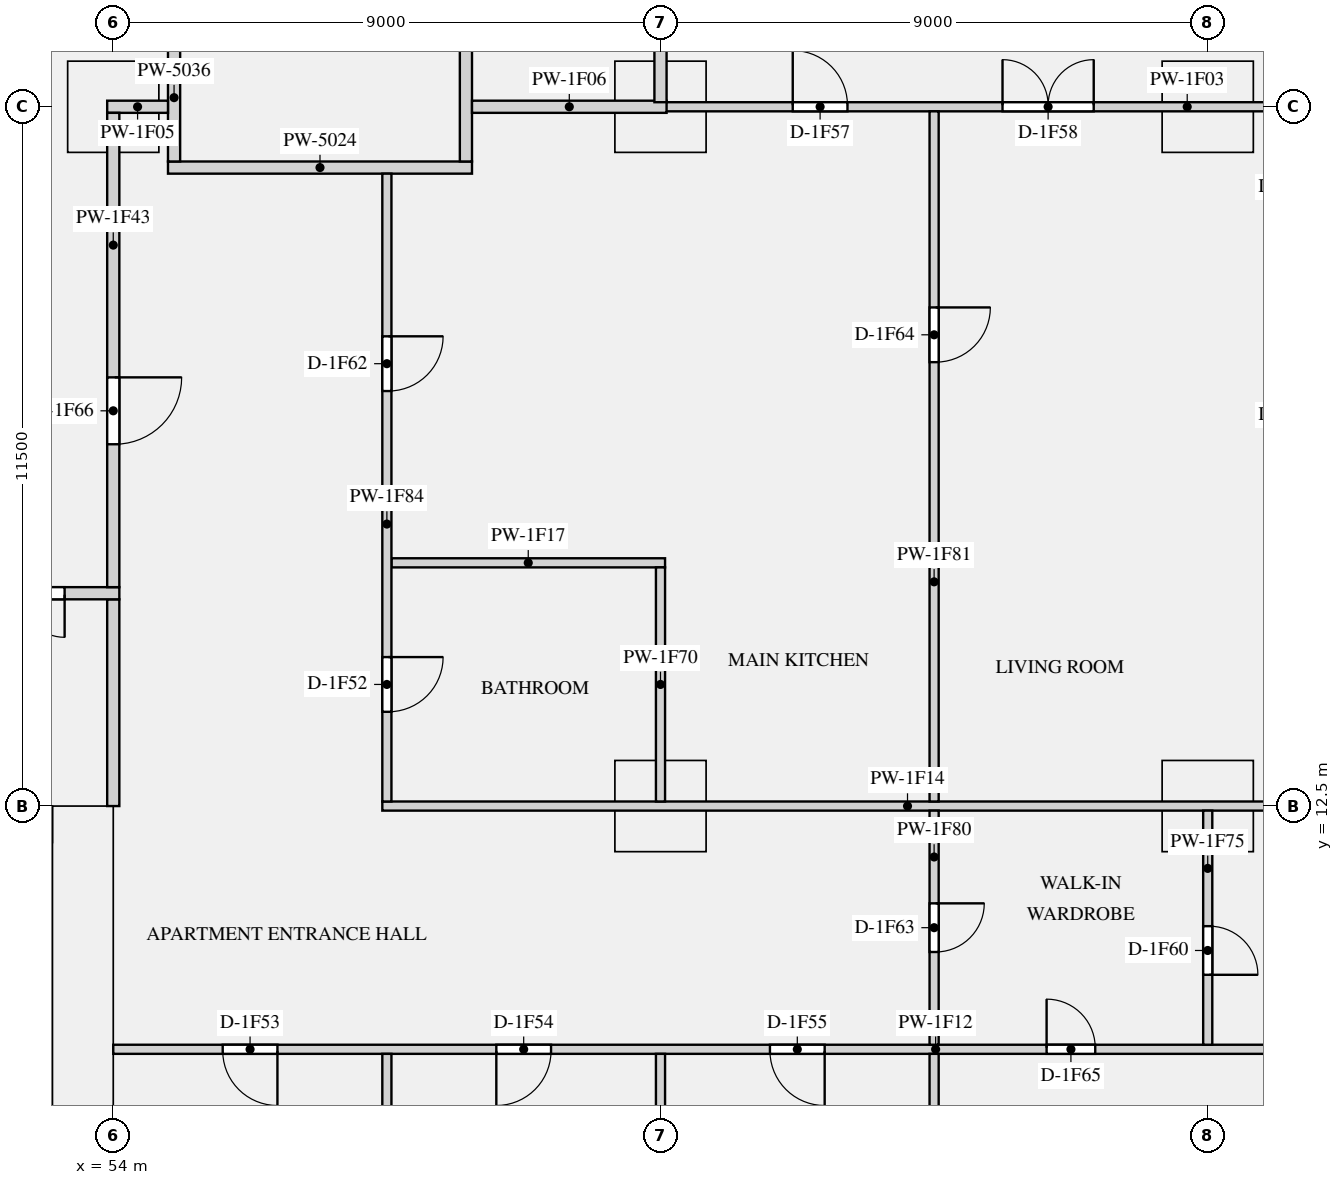
"""IFC4 building model, lengths in metres.
Left out: names, types, materials, properties, quantities, classifications, styles, units other than length and angle.
Written with IfcOpenShell. Run it as: python <this file> out.ifc"""

import sys

from ifc_helpers import new_model, si_unit, direction, frame, frame_2d, origin, origin_2d, place, context, subcontext, project, spatial, rectangle, extrude, element, fill, save


model = new_model("IFC4")
c1 = context("Model", 3, precision=1e-05, world=origin(), true_north=direction((0.0, 1.0)))
c2 = subcontext(c1, "Body", "Model", "MODEL_VIEW")
j1 = project(units=[si_unit("LENGTHUNIT", "METRE"), si_unit("PLANEANGLEUNIT", "RADIAN")], contexts=[c1])
p1 = place(None, origin())
s1 = spatial("IfcSite", under=j1, at=p1, CompositionType="ELEMENT")
p2 = place(p1, origin())
s2 = spatial("IfcBuilding", under=s1, at=p2, CompositionType="ELEMENT")
p3 = place(p2, frame((0.0, 0.0, 60.45)))
s3 = spatial("IfcBuildingStorey", under=s2, at=p3, CompositionType="ELEMENT", Elevation=60.45)
for number, where, z_axis, x_axis in (
    (1, (54.0, 24.0, 0.0), (0.0, 0.0, 1.0), (1.0, 0.0, 0.0)),
    (2, (63.0, 24.0, 0.0), (0.0, 0.0, 1.0), (1.0, 0.0, 0.0)),
    (3, (72.0, 24.0, 0.0), (0.0, 0.0, 1.0), (1.0, 0.0, 0.0)),
    (4, (63.0, 12.5, 0.0), (0.0, 0.0, 1.0), (1.0, 0.0, 0.0)),
    (5, (72.0, 12.5, 0.0), (0.0, 0.0, 1.0), (1.0, 0.0, 0.0)),
):
    element("IfcColumn", number, at=place(p3, frame(where, z_axis=z_axis, x_axis=x_axis)), inside=s3, PredefinedType="COLUMN", context=c2, shape_type="SweptSolid", body=[
        extrude(rectangle(XDim=1.5, YDim=1.5, at=origin_2d()), origin(), (0.0, 0.0, 1.0), 3.15),
    ])
p4 = place(p3, frame((53.5, 0.0, 0.0), z_axis=(0.0, 0.0, 1.0), x_axis=(0.0, 1.0, 0.0)))
e6 = element("IfcWall", 6, at=p4, inside=s3, PredefinedType="SHEAR", context=c2, shape_type="SweptSolid", body=[
    extrude(rectangle(XDim=12.5, YDim=1.0, at=frame_2d((6.25, 0.0))), origin(), (0.0, 0.0, 1.0), 3.15),
])
p5 = place(p3, frame((54.9, 23.0, 0.0), z_axis=(0.0, 0.0, 1.0), x_axis=(1.0, 0.0, 0.0)))
e7 = element("IfcWall", 7, at=p5, inside=s3, PredefinedType="PARTITIONING", context=c2, shape_type="SweptSolid", body=[
    extrude(rectangle(XDim=5.0, YDim=0.2, at=frame_2d((2.5, 0.0))), origin(), (0.0, 0.0, 1.0), 2.83),
])
p6 = place(p3, frame((54.0, 12.5, 0.0), z_axis=(0.0, 0.0, 1.0), x_axis=(0.0, 1.0, 0.0)))
e8 = element("IfcWall", 8, at=p6, inside=s3, PredefinedType="PARTITIONING", context=c2, shape_type="SweptSolid", body=[
    extrude(rectangle(XDim=3.4, YDim=0.2, at=frame_2d((1.7, 0.0))), origin(), (0.0, 0.0, 1.0), 2.83),
])
p7 = place(p3, frame((55.0, 23.1, 0.0), z_axis=(0.0, 0.0, 1.0), x_axis=(0.0, 1.0, 0.0)))
e9 = element("IfcWall", 9, at=p7, inside=s3, PredefinedType="PARTITIONING", context=c2, shape_type="SweptSolid", body=[
    extrude(rectangle(XDim=3.8, YDim=0.2, at=frame_2d((1.9, 0.0))), origin(), (0.0, 0.0, 1.0), 2.83),
])
p8 = place(p7, frame((2.1, 0.0, 0.0)))
e10 = element("IfcOpeningElement", 10, at=p8, cuts=e9, PredefinedType="OPENING", context=c2, shape_type="SweptSolid", body=[
    extrude(rectangle(XDim=1.2, YDim=2.1, at=frame_2d((0.6, 1.05))), frame((0.0, 0.11, 0.0), z_axis=(0.0, -1.0, 0.0), x_axis=(1.0, 0.0, 0.0)), (0.0, 0.0, 1.0), 0.22),
])
p9 = place(p3, frame((59.8, 23.1, 0.0), z_axis=(0.0, 0.0, 1.0), x_axis=(0.0, 1.0, 0.0)))
e11 = element("IfcWall", 11, at=p9, inside=s3, PredefinedType="PARTITIONING", context=c2, shape_type="SweptSolid", body=[
    extrude(rectangle(XDim=3.9, YDim=0.2, at=frame_2d((1.95, 0.0))), origin(), (0.0, 0.0, 1.0), 2.83),
])
p10 = place(p3, frame((62.9, 24.0, 0.0), z_axis=(0.0, 0.0, 1.0), x_axis=(1.0, 0.0, 0.0)))
e12 = element("IfcWall", 12, at=p10, inside=s3, PredefinedType="PARTITIONING", context=c2, shape_type="SweptSolid", body=[
    extrude(rectangle(XDim=10.3, YDim=0.15, at=frame_2d((5.15, 0.0))), origin(), (0.0, 0.0, 1.0), 2.83),
])
p11 = place(p10, frame((2.275, 0.0, 0.0)))
e13 = element("IfcOpeningElement", 13, at=p11, cuts=e12, PredefinedType="OPENING", context=c2, shape_type="SweptSolid", body=[
    extrude(rectangle(XDim=0.9, YDim=2.1, at=frame_2d((0.45, 1.05))), frame((0.0, 0.085, 0.0), z_axis=(0.0, -1.0, 0.0), x_axis=(1.0, 0.0, 0.0)), (0.0, 0.0, 1.0), 0.17),
])
p12 = place(p10, frame((5.725, 0.0, 0.0)))
e14 = element("IfcOpeningElement", 14, at=p12, cuts=e12, PredefinedType="OPENING", context=c2, shape_type="SweptSolid", body=[
    extrude(rectangle(XDim=1.5, YDim=2.1, at=frame_2d((0.75, 1.05))), frame((0.0, 0.085, 0.0), z_axis=(0.0, -1.0, 0.0), x_axis=(1.0, 0.0, 0.0)), (0.0, 0.0, 1.0), 0.17),
])
p13 = place(p3, frame((53.9, 24.0, 0.0), z_axis=(0.0, 0.0, 1.0), x_axis=(1.0, 0.0, 0.0)))
e15 = element("IfcWall", 15, at=p13, inside=s3, PredefinedType="PARTITIONING", context=c2, shape_type="SweptSolid", body=[
    extrude(rectangle(XDim=1.0, YDim=0.2, at=frame_2d((0.5, 0.0))), origin(), (0.0, 0.0, 1.0), 2.83),
])
p14 = place(p3, frame((59.9, 24.0, 0.0), z_axis=(0.0, 0.0, 1.0), x_axis=(1.0, 0.0, 0.0)))
e16 = element("IfcWall", 16, at=p14, inside=s3, PredefinedType="PARTITIONING", context=c2, shape_type="SweptSolid", body=[
    extrude(rectangle(XDim=3.2, YDim=0.2, at=frame_2d((1.6, 0.0))), origin(), (0.0, 0.0, 1.0), 2.83),
])
p15 = place(p3, frame((54.0, 8.5, 0.0), z_axis=(0.0, 0.0, 1.0), x_axis=(1.0, 0.0, 0.0)))
e17 = element("IfcWall", 17, at=p15, inside=s3, PredefinedType="PARTITIONING", context=c2, shape_type="SweptSolid", body=[
    extrude(rectangle(XDim=21.7, YDim=0.15, at=frame_2d((10.85, 0.0))), origin(), (0.0, 0.0, 1.0), 2.83),
])
p16 = place(p15, frame((1.8, 0.0, 0.0)))
e18 = element("IfcOpeningElement", 18, at=p16, cuts=e17, PredefinedType="OPENING", context=c2, shape_type="SweptSolid", body=[
    extrude(rectangle(XDim=0.9, YDim=2.1, at=frame_2d((0.45, 1.05))), frame((0.0, 0.085, 0.0), z_axis=(0.0, -1.0, 0.0), x_axis=(1.0, 0.0, 0.0)), (0.0, 0.0, 1.0), 0.17),
])
p17 = place(p15, frame((6.3, 0.0, 0.0)))
e19 = element("IfcOpeningElement", 19, at=p17, cuts=e17, PredefinedType="OPENING", context=c2, shape_type="SweptSolid", body=[
    extrude(rectangle(XDim=0.9, YDim=2.1, at=frame_2d((0.45, 1.05))), frame((0.0, 0.085, 0.0), z_axis=(0.0, -1.0, 0.0), x_axis=(1.0, 0.0, 0.0)), (0.0, 0.0, 1.0), 0.17),
])
p18 = place(p15, frame((10.8, 0.0, 0.0)))
e20 = element("IfcOpeningElement", 20, at=p18, cuts=e17, PredefinedType="OPENING", context=c2, shape_type="SweptSolid", body=[
    extrude(rectangle(XDim=0.9, YDim=2.1, at=frame_2d((0.45, 1.05))), frame((0.0, 0.085, 0.0), z_axis=(0.0, -1.0, 0.0), x_axis=(1.0, 0.0, 0.0)), (0.0, 0.0, 1.0), 0.17),
])
p19 = place(p15, frame((19.525, 0.0, 0.0)))
e21 = element("IfcOpeningElement", 21, at=p19, cuts=e17, PredefinedType="OPENING", context=c2, shape_type="SweptSolid", body=[
    extrude(rectangle(XDim=0.8, YDim=2.1, at=frame_2d((0.4, 1.05))), frame((0.0, 0.085, 0.0), z_axis=(0.0, -1.0, 0.0), x_axis=(1.0, 0.0, 0.0)), (0.0, 0.0, 1.0), 0.17),
])
p20 = place(p15, frame((15.35, 0.0, 0.0)))
e22 = element("IfcOpeningElement", 22, at=p20, cuts=e17, PredefinedType="OPENING", context=c2, shape_type="SweptSolid", body=[
    extrude(rectangle(XDim=0.8, YDim=2.1, at=frame_2d((0.4, 1.05))), frame((0.0, 0.085, 0.0), z_axis=(0.0, -1.0, 0.0), x_axis=(1.0, 0.0, 0.0)), (0.0, 0.0, 1.0), 0.17),
])
p21 = place(p3, frame((58.425, 12.5, 0.0), z_axis=(0.0, 0.0, 1.0), x_axis=(1.0, 0.0, 0.0)))
e23 = element("IfcWall", 23, at=p21, inside=s3, PredefinedType="PARTITIONING", context=c2, shape_type="SweptSolid", body=[
    extrude(rectangle(XDim=17.275, YDim=0.15, at=frame_2d((8.637, 0.0))), origin(), (0.0, 0.0, 1.0), 2.83),
])
p22 = place(p3, frame((58.575, 16.5, 0.0), z_axis=(0.0, 0.0, 1.0), x_axis=(1.0, 0.0, 0.0)))
e24 = element("IfcWall", 24, at=p22, inside=s3, PredefinedType="PARTITIONING", context=c2, shape_type="SweptSolid", body=[
    extrude(rectangle(XDim=4.5, YDim=0.15, at=frame_2d((2.25, 0.0))), origin(), (0.0, 0.0, 1.0), 2.83),
])
p23 = place(p3, frame((17.9, 16.0, 0.0), z_axis=(0.0, 0.0, 1.0), x_axis=(1.0, 0.0, 0.0)))
e25 = element("IfcWall", 25, at=p23, inside=s3, PredefinedType="PARTITIONING", context=c2, shape_type="SweptSolid", body=[
    extrude(rectangle(XDim=36.2, YDim=0.2, at=frame_2d((18.1, 0.0))), origin(), (0.0, 0.0, 1.0), 2.83),
])
p24 = place(p23, frame((0.9, 0.0, 0.0)))
e26 = element("IfcOpeningElement", 26, at=p24, cuts=e25, PredefinedType="OPENING", context=c2, shape_type="SweptSolid", body=[
    extrude(rectangle(XDim=1.4, YDim=2.1, at=frame_2d((0.7, 1.05))), frame((0.0, 0.11, 0.0), z_axis=(0.0, -1.0, 0.0), x_axis=(1.0, 0.0, 0.0)), (0.0, 0.0, 1.0), 0.22),
])
p25 = place(p23, frame((33.9, 0.0, 0.0)))
e27 = element("IfcOpeningElement", 27, at=p25, cuts=e25, PredefinedType="OPENING", context=c2, shape_type="SweptSolid", body=[
    extrude(rectangle(XDim=1.4, YDim=2.1, at=frame_2d((0.7, 1.05))), frame((0.0, 0.11, 0.0), z_axis=(0.0, -1.0, 0.0), x_axis=(1.0, 0.0, 0.0)), (0.0, 0.0, 1.0), 0.22),
])
p26 = place(p3, frame((54.0, 16.1, 0.0), z_axis=(0.0, 0.0, 1.0), x_axis=(0.0, 1.0, 0.0)))
e28 = element("IfcWall", 28, at=p26, inside=s3, PredefinedType="PARTITIONING", context=c2, shape_type="SweptSolid", body=[
    extrude(rectangle(XDim=7.8, YDim=0.2, at=frame_2d((3.9, 0.0))), origin(), (0.0, 0.0, 1.0), 2.83),
])
p27 = place(p26, frame((2.35, 0.0, 0.0)))
e29 = element("IfcOpeningElement", 29, at=p27, cuts=e28, PredefinedType="OPENING", context=c2, shape_type="SweptSolid", body=[
    extrude(rectangle(XDim=1.1, YDim=2.1, at=frame_2d((0.55, 1.05))), frame((0.0, 0.11, 0.0), z_axis=(0.0, -1.0, 0.0), x_axis=(1.0, 0.0, 0.0)), (0.0, 0.0, 1.0), 0.22),
])
p28 = place(p3, frame((63.0, 0.8, 0.0), z_axis=(0.0, 0.0, 1.0), x_axis=(0.0, 1.0, 0.0)))
e30 = element("IfcWall", 30, at=p28, inside=s3, PredefinedType="PARTITIONING", context=c2, shape_type="SweptSolid", body=[
    extrude(rectangle(XDim=7.625, YDim=0.15, at=frame_2d((3.812, 0.0))), origin(), (0.0, 0.0, 1.0), 2.83),
])
p29 = place(p3, frame((63.0, 12.575, 0.0), z_axis=(0.0, 0.0, 1.0), x_axis=(0.0, 1.0, 0.0)))
e31 = element("IfcWall", 31, at=p29, inside=s3, PredefinedType="PARTITIONING", context=c2, shape_type="SweptSolid", body=[
    extrude(rectangle(XDim=3.85, YDim=0.15, at=frame_2d((1.925, 0.0))), origin(), (0.0, 0.0, 1.0), 2.83),
])
p30 = place(p3, frame((63.0, 24.075, 0.0), z_axis=(0.0, 0.0, 1.0), x_axis=(0.0, 1.0, 0.0)))
e32 = element("IfcWall", 32, at=p30, inside=s3, PredefinedType="PARTITIONING", context=c2, shape_type="SweptSolid", body=[
    extrude(rectangle(XDim=12.075, YDim=0.2, at=frame_2d((6.038, 0.0))), origin(), (0.0, 0.0, 1.0), 2.83),
])
p31 = place(p3, frame((72.0, 8.575, 0.0), z_axis=(0.0, 0.0, 1.0), x_axis=(0.0, 1.0, 0.0)))
e33 = element("IfcWall", 33, at=p31, inside=s3, PredefinedType="PARTITIONING", context=c2, shape_type="SweptSolid", body=[
    extrude(rectangle(XDim=3.85, YDim=0.15, at=frame_2d((1.925, 0.0))), origin(), (0.0, 0.0, 1.0), 2.83),
])
p32 = place(p31, frame((1.15, 0.0, 0.0)))
e34 = element("IfcOpeningElement", 34, at=p32, cuts=e33, PredefinedType="OPENING", context=c2, shape_type="SweptSolid", body=[
    extrude(rectangle(XDim=0.8, YDim=2.1, at=frame_2d((0.4, 1.05))), frame((0.0, 0.085, 0.0), z_axis=(0.0, -1.0, 0.0), x_axis=(1.0, 0.0, 0.0)), (0.0, 0.0, 1.0), 0.17),
])
p33 = place(p3, frame((67.5, 0.8, 0.0), z_axis=(0.0, 0.0, 1.0), x_axis=(0.0, 1.0, 0.0)))
e35 = element("IfcWall", 35, at=p33, inside=s3, PredefinedType="PARTITIONING", context=c2, shape_type="SweptSolid", body=[
    extrude(rectangle(XDim=7.625, YDim=0.15, at=frame_2d((3.812, 0.0))), origin(), (0.0, 0.0, 1.0), 2.83),
])
p34 = place(p3, frame((67.5, 8.575, 0.0), z_axis=(0.0, 0.0, 1.0), x_axis=(0.0, 1.0, 0.0)))
e36 = element("IfcWall", 36, at=p34, inside=s3, PredefinedType="PARTITIONING", context=c2, shape_type="SweptSolid", body=[
    extrude(rectangle(XDim=3.85, YDim=0.15, at=frame_2d((1.925, 0.0))), origin(), (0.0, 0.0, 1.0), 2.83),
])
p35 = place(p34, frame((1.525, 0.0, 0.0)))
e37 = element("IfcOpeningElement", 37, at=p35, cuts=e36, PredefinedType="OPENING", context=c2, shape_type="SweptSolid", body=[
    extrude(rectangle(XDim=0.8, YDim=2.1, at=frame_2d((0.4, 1.05))), frame((0.0, 0.085, 0.0), z_axis=(0.0, -1.0, 0.0), x_axis=(1.0, 0.0, 0.0)), (0.0, 0.0, 1.0), 0.17),
])
p36 = place(p3, frame((67.5, 12.575, 0.0), z_axis=(0.0, 0.0, 1.0), x_axis=(0.0, 1.0, 0.0)))
e38 = element("IfcWall", 38, at=p36, inside=s3, PredefinedType="PARTITIONING", context=c2, shape_type="SweptSolid", body=[
    extrude(rectangle(XDim=11.35, YDim=0.15, at=frame_2d((5.675, 0.0))), origin(), (0.0, 0.0, 1.0), 2.83),
])
p37 = place(p36, frame((7.225, 0.0, 0.0)))
e39 = element("IfcOpeningElement", 39, at=p37, cuts=e38, PredefinedType="OPENING", context=c2, shape_type="SweptSolid", body=[
    extrude(rectangle(XDim=0.9, YDim=2.1, at=frame_2d((0.45, 1.05))), frame((0.0, 0.085, 0.0), z_axis=(0.0, -1.0, 0.0), x_axis=(1.0, 0.0, 0.0)), (0.0, 0.0, 1.0), 0.17),
])
p38 = place(p3, frame((58.5, 0.8, 0.0), z_axis=(0.0, 0.0, 1.0), x_axis=(0.0, 1.0, 0.0)))
e40 = element("IfcWall", 40, at=p38, inside=s3, PredefinedType="PARTITIONING", context=c2, shape_type="SweptSolid", body=[
    extrude(rectangle(XDim=7.625, YDim=0.15, at=frame_2d((3.812, 0.0))), origin(), (0.0, 0.0, 1.0), 2.83),
])
p39 = place(p3, frame((58.5, 12.575, 0.0), z_axis=(0.0, 0.0, 1.0), x_axis=(0.0, 1.0, 0.0)))
e41 = element("IfcWall", 41, at=p39, inside=s3, PredefinedType="PARTITIONING", context=c2, shape_type="SweptSolid", body=[
    extrude(rectangle(XDim=10.325, YDim=0.15, at=frame_2d((5.163, 0.0))), origin(), (0.0, 0.0, 1.0), 2.83),
])
p40 = place(p39, frame((1.475, 0.0, 0.0)))
e42 = element("IfcOpeningElement", 42, at=p40, cuts=e41, PredefinedType="OPENING", context=c2, shape_type="SweptSolid", body=[
    extrude(rectangle(XDim=0.9, YDim=2.1, at=frame_2d((0.45, 1.05))), frame((0.0, 0.085, 0.0), z_axis=(0.0, -1.0, 0.0), x_axis=(1.0, 0.0, 0.0)), (0.0, 0.0, 1.0), 0.17),
])
p41 = place(p39, frame((6.75, 0.0, 0.0)))
e43 = element("IfcOpeningElement", 43, at=p41, cuts=e41, PredefinedType="OPENING", context=c2, shape_type="SweptSolid", body=[
    extrude(rectangle(XDim=0.9, YDim=2.1, at=frame_2d((0.45, 1.05))), frame((0.0, 0.085, 0.0), z_axis=(0.0, -1.0, 0.0), x_axis=(1.0, 0.0, 0.0)), (0.0, 0.0, 1.0), 0.17),
])
p42 = place(p25, frame((1.4, 0.0, 0.0), z_axis=(0.0, 0.0, 1.0), x_axis=(-1.0, 0.0, 0.0)))
e44 = element("IfcDoor", 44, at=p42, inside=s3, OperationType="DOUBLE_DOOR_SINGLE_SWING", PredefinedType="DOOR", context=c2, shape_type="SweptSolid", body=[
    extrude(rectangle(XDim=1.4, YDim=2.1, at=frame_2d((0.7, 1.05))), frame((0.0, 0.025, 0.0), z_axis=(0.0, -1.0, 0.0), x_axis=(1.0, 0.0, 0.0)), (0.0, 0.0, 1.0), 0.05),
])
fill(e27, e44)
p43 = place(p40, frame((0.9, 0.0, 0.0), z_axis=(0.0, 0.0, 1.0), x_axis=(-1.0, 0.0, 0.0)))
e45 = element("IfcDoor", 45, at=p43, inside=s3, OperationType="SINGLE_SWING_LEFT", PredefinedType="DOOR", context=c2, shape_type="SweptSolid", body=[
    extrude(rectangle(XDim=0.9, YDim=2.1, at=frame_2d((0.45, 1.05))), frame((0.0, 0.025, 0.0), z_axis=(0.0, -1.0, 0.0), x_axis=(1.0, 0.0, 0.0)), (0.0, 0.0, 1.0), 0.05),
])
fill(e42, e45)
p44 = place(p16, frame((0.9, 0.0, 0.0), z_axis=(0.0, 0.0, 1.0), x_axis=(-1.0, 0.0, 0.0)))
e46 = element("IfcDoor", 46, at=p44, inside=s3, OperationType="SINGLE_SWING_LEFT", PredefinedType="DOOR", context=c2, shape_type="SweptSolid", body=[
    extrude(rectangle(XDim=0.9, YDim=2.1, at=frame_2d((0.45, 1.05))), frame((0.0, 0.025, 0.0), z_axis=(0.0, -1.0, 0.0), x_axis=(1.0, 0.0, 0.0)), (0.0, 0.0, 1.0), 0.05),
])
fill(e18, e46)
p45 = place(p17, frame((0.9, 0.0, 0.0), z_axis=(0.0, 0.0, 1.0), x_axis=(-1.0, 0.0, 0.0)))
e47 = element("IfcDoor", 47, at=p45, inside=s3, OperationType="SINGLE_SWING_RIGHT", PredefinedType="DOOR", context=c2, shape_type="SweptSolid", body=[
    extrude(rectangle(XDim=0.9, YDim=2.1, at=frame_2d((0.45, 1.05))), frame((0.0, 0.025, 0.0), z_axis=(0.0, -1.0, 0.0), x_axis=(1.0, 0.0, 0.0)), (0.0, 0.0, 1.0), 0.05),
])
fill(e19, e47)
p46 = place(p18, frame((0.9, 0.0, 0.0), z_axis=(0.0, 0.0, 1.0), x_axis=(-1.0, 0.0, 0.0)))
e48 = element("IfcDoor", 48, at=p46, inside=s3, OperationType="SINGLE_SWING_LEFT", PredefinedType="DOOR", context=c2, shape_type="SweptSolid", body=[
    extrude(rectangle(XDim=0.9, YDim=2.1, at=frame_2d((0.45, 1.05))), frame((0.0, 0.025, 0.0), z_axis=(0.0, -1.0, 0.0), x_axis=(1.0, 0.0, 0.0)), (0.0, 0.0, 1.0), 0.05),
])
fill(e20, e48)
p47 = place(p11, origin())
e49 = element("IfcDoor", 49, at=p47, inside=s3, OperationType="SINGLE_SWING_LEFT", PredefinedType="DOOR", context=c2, shape_type="SweptSolid", body=[
    extrude(rectangle(XDim=0.9, YDim=2.1, at=frame_2d((0.45, 1.05))), frame((0.0, 0.025, 0.0), z_axis=(0.0, -1.0, 0.0), x_axis=(1.0, 0.0, 0.0)), (0.0, 0.0, 1.0), 0.05),
])
fill(e13, e49)
p48 = place(p12, origin())
e50 = element("IfcDoor", 50, at=p48, inside=s3, OperationType="DOUBLE_DOOR_SINGLE_SWING", PredefinedType="DOOR", context=c2, shape_type="SweptSolid", body=[
    extrude(rectangle(XDim=1.5, YDim=2.1, at=frame_2d((0.75, 1.05))), frame((0.0, 0.025, 0.0), z_axis=(0.0, -1.0, 0.0), x_axis=(1.0, 0.0, 0.0)), (0.0, 0.0, 1.0), 0.05),
])
fill(e14, e50)
p49 = place(p32, frame((0.8, 0.0, 0.0), z_axis=(0.0, 0.0, 1.0), x_axis=(-1.0, 0.0, 0.0)))
e51 = element("IfcDoor", 51, at=p49, inside=s3, OperationType="SINGLE_SWING_RIGHT", PredefinedType="DOOR", context=c2, shape_type="SweptSolid", body=[
    extrude(rectangle(XDim=0.8, YDim=2.1, at=frame_2d((0.4, 1.05))), frame((0.0, 0.025, 0.0), z_axis=(0.0, -1.0, 0.0), x_axis=(1.0, 0.0, 0.0)), (0.0, 0.0, 1.0), 0.05),
])
fill(e34, e51)
p50 = place(p41, frame((0.9, 0.0, 0.0), z_axis=(0.0, 0.0, 1.0), x_axis=(-1.0, 0.0, 0.0)))
e52 = element("IfcDoor", 52, at=p50, inside=s3, OperationType="SINGLE_SWING_LEFT", PredefinedType="DOOR", context=c2, shape_type="SweptSolid", body=[
    extrude(rectangle(XDim=0.9, YDim=2.1, at=frame_2d((0.45, 1.05))), frame((0.0, 0.025, 0.0), z_axis=(0.0, -1.0, 0.0), x_axis=(1.0, 0.0, 0.0)), (0.0, 0.0, 1.0), 0.05),
])
fill(e43, e52)
p51 = place(p35, frame((0.8, 0.0, 0.0), z_axis=(0.0, 0.0, 1.0), x_axis=(-1.0, 0.0, 0.0)))
e53 = element("IfcDoor", 53, at=p51, inside=s3, OperationType="SINGLE_SWING_LEFT", PredefinedType="DOOR", context=c2, shape_type="SweptSolid", body=[
    extrude(rectangle(XDim=0.8, YDim=2.1, at=frame_2d((0.4, 1.05))), frame((0.0, 0.025, 0.0), z_axis=(0.0, -1.0, 0.0), x_axis=(1.0, 0.0, 0.0)), (0.0, 0.0, 1.0), 0.05),
])
fill(e37, e53)
p52 = place(p37, frame((0.9, 0.0, 0.0), z_axis=(0.0, 0.0, 1.0), x_axis=(-1.0, 0.0, 0.0)))
e54 = element("IfcDoor", 54, at=p52, inside=s3, OperationType="SINGLE_SWING_LEFT", PredefinedType="DOOR", context=c2, shape_type="SweptSolid", body=[
    extrude(rectangle(XDim=0.9, YDim=2.1, at=frame_2d((0.45, 1.05))), frame((0.0, 0.025, 0.0), z_axis=(0.0, -1.0, 0.0), x_axis=(1.0, 0.0, 0.0)), (0.0, 0.0, 1.0), 0.05),
])
fill(e39, e54)
p53 = place(p20, origin())
e55 = element("IfcDoor", 55, at=p53, inside=s3, OperationType="SINGLE_SWING_LEFT", PredefinedType="DOOR", context=c2, shape_type="SweptSolid", body=[
    extrude(rectangle(XDim=0.8, YDim=2.1, at=frame_2d((0.4, 1.05))), frame((0.0, 0.025, 0.0), z_axis=(0.0, -1.0, 0.0), x_axis=(1.0, 0.0, 0.0)), (0.0, 0.0, 1.0), 0.05),
])
fill(e22, e55)
p54 = place(p27, frame((1.1, 0.0, 0.0), z_axis=(0.0, 0.0, 1.0), x_axis=(-1.0, 0.0, 0.0)))
e56 = element("IfcDoor", 56, at=p54, inside=s3, OperationType="SINGLE_SWING_LEFT", PredefinedType="DOOR", context=c2, shape_type="SweptSolid", body=[
    extrude(rectangle(XDim=1.1, YDim=2.1, at=frame_2d((0.55, 1.05))), frame((0.0, 0.025, 0.0), z_axis=(0.0, -1.0, 0.0), x_axis=(1.0, 0.0, 0.0)), (0.0, 0.0, 1.0), 0.05),
])
fill(e29, e56)
save(model, sys.argv[1])
